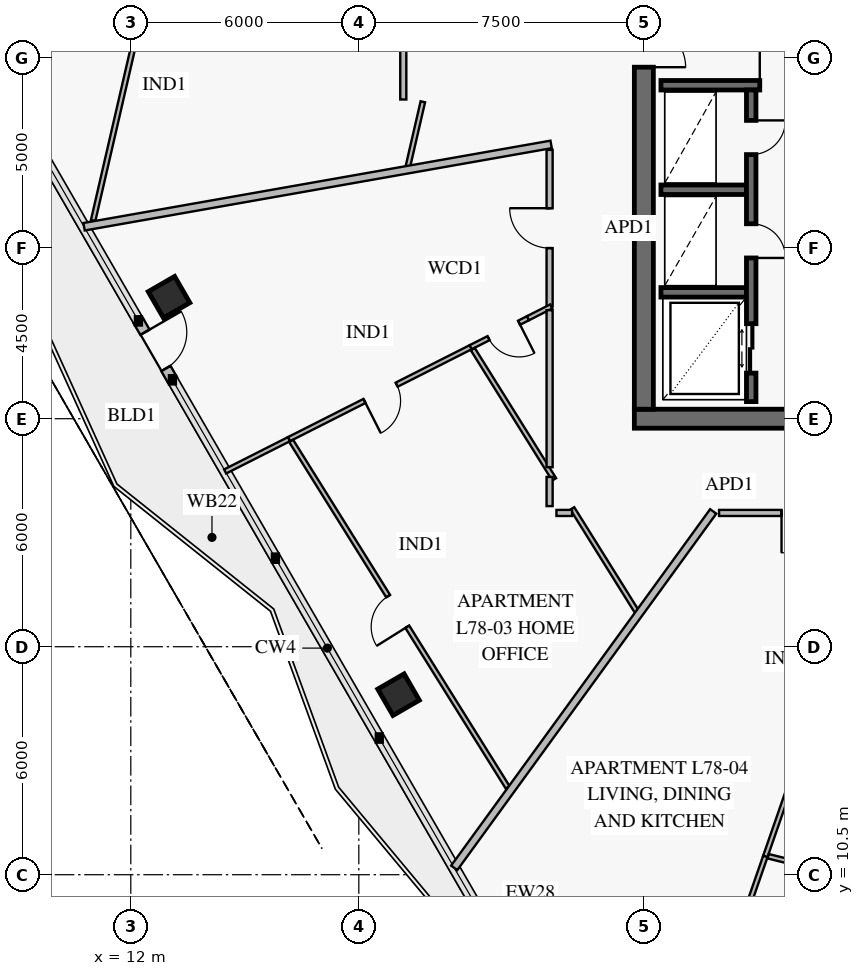
"""IFC4 building model, lengths in metres.
Left out: names, types, materials, properties, quantities, classifications, styles, units other than length and angle.
Written with IfcOpenShell. Run it as: python <this file> out.ifc"""

import sys

from ifc_helpers import new_model, si_unit, direction, frame, frame_2d, origin, origin_2d, place, context, subcontext, project, spatial, rectangle, extrude, element, fill, save


model = new_model("IFC4")
c1 = context("Model", 3, precision=1e-05, world=origin(), true_north=direction((0.0, 1.0)))
c2 = subcontext(c1, "Body", "Model", "MODEL_VIEW")
j1 = project(units=[si_unit("LENGTHUNIT", "METRE"), si_unit("PLANEANGLEUNIT", "RADIAN")], contexts=[c1])
p1 = place(None, origin())
s1 = spatial("IfcSite", under=j1, at=p1, CompositionType="ELEMENT")
p2 = place(p1, origin())
s2 = spatial("IfcBuilding", under=s1, at=p2, CompositionType="ELEMENT")
p3 = place(p2, frame((0.0, 0.0, 308.2)))
s3 = spatial("IfcBuildingStorey", under=s2, at=p3, CompositionType="ELEMENT", Elevation=308.2)
p4 = place(p3, frame((25.25, 22.5, 0.0), z_axis=(0.0, 0.0, 1.0), x_axis=(1.0, 0.0, 0.0)))
e1 = element("IfcWall", 1, at=p4, inside=s3, PredefinedType="SHEAR", context=c2, shape_type="SweptSolid", body=[
    extrude(rectangle(XDim=9.8, YDim=0.5, at=frame_2d((4.9, 0.0))), origin(), (0.0, 0.0, 1.0), 3.8),
])
p5 = place(p4, frame((4.15, 0.0, 0.0)))
e2 = element("IfcOpeningElement", 2, at=p5, cuts=e1, PredefinedType="OPENING", context=c2, shape_type="SweptSolid", body=[
    extrude(rectangle(XDim=1.5, YDim=2.15, at=frame_2d((0.75, 1.075))), frame((0.0, 0.262, 0.0), z_axis=(0.0, -1.0, 0.0), x_axis=(1.0, 0.0, 0.0)), (0.0, 0.0, 1.0), 0.524),
])
p6 = place(p3, frame((25.5, 22.75, 0.0), z_axis=(0.0, 0.0, 1.0), x_axis=(0.0, 1.0, 0.0)))
e3 = element("IfcWall", 3, at=p6, inside=s3, PredefinedType="SHEAR", context=c2, shape_type="SweptSolid", body=[
    extrude(rectangle(XDim=18.5, YDim=0.5, at=frame_2d((9.25, 0.0))), origin(), (0.0, 0.0, 1.0), 3.8),
])
p7 = place(p6, frame((9.0, 0.0, 0.0)))
e4 = element("IfcOpeningElement", 4, at=p7, cuts=e3, PredefinedType="OPENING", context=c2, shape_type="SweptSolid", body=[
    extrude(rectangle(XDim=1.1, YDim=2.15, at=frame_2d((0.55, 1.075))), frame((0.0, 0.262, 0.0), z_axis=(0.0, -1.0, 0.0), x_axis=(1.0, 0.0, 0.0)), (0.0, 0.0, 1.0), 0.524),
])
for number, where, z_axis, x_axis in (
    (5, (13.007, 25.698, 0.0), (0.0, 0.0, 1.0), (0.5, -0.866, 0.0)),
    (6, (19.045, 15.238, 0.0), (0.0, 0.0, 1.0), (0.5, -0.866, 0.0)),
):
    element("IfcColumn", number, at=place(p3, frame(where, z_axis=z_axis, x_axis=x_axis)), inside=s3, PredefinedType="COLUMN", context=c2, shape_type="SweptSolid", body=[
        extrude(rectangle(XDim=0.8, YDim=0.8, at=origin_2d()), origin(), (0.0, 0.0, 1.0), 3.55),
    ])
p8 = place(p3, frame((13.095, 23.524, 0.0), z_axis=(0.0, 0.0, 1.0), x_axis=(-0.499923131819, 0.866069779101, 0.0)))
e7 = element("IfcWall", 7, at=p8, inside=s3, PredefinedType="SOLIDWALL", context=c2, shape_type="SweptSolid", body=[
    extrude(rectangle(XDim=1.79, YDim=0.28, at=frame_2d((0.895, 0.0))), origin(), (0.0, 0.0, 1.0), 3.55),
])
p9 = place(p8, frame((0.345, 0.0, 0.0)))
e8 = element("IfcOpeningElement", 8, at=p9, cuts=e7, PredefinedType="OPENING", context=c2, shape_type="SweptSolid", body=[
    extrude(rectangle(XDim=1.1, YDim=2.2, at=frame_2d((0.55, 1.1))), frame((0.0, 0.152, 0.0), z_axis=(0.0, -1.0, 0.0), x_axis=(1.0, 0.0, 0.0)), (0.0, 0.0, 1.0), 0.304),
])
p10 = place(p3, frame((25.95, 31.275, 0.0), z_axis=(0.0, 0.0, 1.0), x_axis=(1.0, 0.0, 0.0)))
e9 = element("IfcWall", 9, at=p10, inside=s3, PredefinedType="SOLIDWALL", context=c2, shape_type="SweptSolid", body=[
    extrude(rectangle(XDim=20.1, YDim=0.25, at=frame_2d((10.05, 0.0))), origin(), (0.0, 0.0, 1.0), 3.8),
])
p11 = place(p10, frame((2.6, 0.0, 0.0)))
e10 = element("IfcOpeningElement", 10, at=p11, cuts=e9, PredefinedType="OPENING", context=c2, shape_type="SweptSolid", body=[
    extrude(rectangle(XDim=1.1, YDim=2.15, at=frame_2d((0.55, 1.075))), frame((0.0, 0.137, 0.0), z_axis=(0.0, -1.0, 0.0), x_axis=(1.0, 0.0, 0.0)), (0.0, 0.0, 1.0), 0.274),
])
p12 = place(p10, frame((10.6, 0.0, 0.0)))
e11 = element("IfcOpeningElement", 11, at=p12, cuts=e9, PredefinedType="OPENING", context=c2, shape_type="SweptSolid", body=[
    extrude(rectangle(XDim=1.1, YDim=2.15, at=frame_2d((0.55, 1.075))), frame((0.0, 0.137, 0.0), z_axis=(0.0, -1.0, 0.0), x_axis=(1.0, 0.0, 0.0)), (0.0, 0.0, 1.0), 0.274),
])
p13 = place(p10, frame((16.35, 0.0, 0.0)))
e12 = element("IfcOpeningElement", 12, at=p13, cuts=e9, PredefinedType="OPENING", context=c2, shape_type="SweptSolid", body=[
    extrude(rectangle(XDim=1.1, YDim=2.15, at=frame_2d((0.55, 1.075))), frame((0.0, 0.137, 0.0), z_axis=(0.0, -1.0, 0.0), x_axis=(1.0, 0.0, 0.0)), (0.0, 0.0, 1.0), 0.274),
])
for number, where, z_axis, x_axis in (
    (13, (25.95, 25.825, 0.0), (0.0, 0.0, 1.0), (1.0, 0.0, 0.0)),
    (14, (25.95, 28.525, 0.0), (0.0, 0.0, 1.0), (1.0, 0.0, 0.0)),
):
    element("IfcWall", number, at=place(p3, frame(where, z_axis=z_axis, x_axis=x_axis)), inside=s3, PredefinedType="SOLIDWALL", context=c2, shape_type="SweptSolid", body=[
        extrude(rectangle(XDim=2.25, YDim=0.25, at=frame_2d((1.125, 0.0))), origin(), (0.0, 0.0, 1.0), 3.8),
    ])
p14 = place(p3, frame((28.325, 22.95, 0.0), z_axis=(0.0, 0.0, 1.0), x_axis=(0.0, 1.0, 0.0)))
e15 = element("IfcWall", 15, at=p14, inside=s3, PredefinedType="SOLIDWALL", context=c2, shape_type="SweptSolid", body=[
    extrude(rectangle(XDim=8.2, YDim=0.25, at=frame_2d((4.1, 0.0))), origin(), (0.0, 0.0, 1.0), 3.8),
])
p15 = place(p14, frame((0.75, 0.0, 0.0)))
e16 = element("IfcOpeningElement", 16, at=p15, cuts=e15, PredefinedType="OPENING", context=c2, shape_type="SweptSolid", body=[
    extrude(rectangle(XDim=1.3, YDim=2.3, at=frame_2d((0.65, 1.15))), frame((0.0, 0.137, 0.0), z_axis=(0.0, -1.0, 0.0), x_axis=(1.0, 0.0, 0.0)), (0.0, 0.0, 1.0), 0.274),
])
p16 = place(p14, frame((3.78, 0.0, 0.0)))
e17 = element("IfcOpeningElement", 17, at=p16, cuts=e15, PredefinedType="OPENING", context=c2, shape_type="SweptSolid", body=[
    extrude(rectangle(XDim=0.9, YDim=2.1, at=frame_2d((0.45, 1.05))), frame((0.0, 0.137, 0.0), z_axis=(0.0, -1.0, 0.0), x_axis=(1.0, 0.0, 0.0)), (0.0, 0.0, 1.0), 0.274),
])
p17 = place(p14, frame((6.5, 0.0, 0.0)))
e18 = element("IfcOpeningElement", 18, at=p17, cuts=e15, PredefinedType="OPENING", context=c2, shape_type="SweptSolid", body=[
    extrude(rectangle(XDim=0.9, YDim=2.1, at=frame_2d((0.45, 1.05))), frame((0.0, 0.137, 0.0), z_axis=(0.0, -1.0, 0.0), x_axis=(1.0, 0.0, 0.0)), (0.0, 0.0, 1.0), 0.274),
])
p18 = place(p3, frame((13.356, 37.882, 0.0), z_axis=(0.0, 0.0, 1.0), x_axis=(-0.224948374829, -0.974370683396, 0.0)))
e19 = element("IfcWall", 19, at=p18, inside=s3, PredefinedType="PARTITIONING", context=c2, shape_type="SweptSolid", body=[
    extrude(rectangle(XDim=10.433, YDim=0.12, at=frame_2d((5.217, 0.0))), origin(), (0.0, 0.0, 1.0), 2.97),
])
p19 = place(p18, frame((4.742, 0.0, 0.0)))
e20 = element("IfcOpeningElement", 20, at=p19, cuts=e19, PredefinedType="OPENING", context=c2, shape_type="SweptSolid", body=[
    extrude(rectangle(XDim=0.95, YDim=2.1, at=frame_2d((0.475, 1.05))), frame((0.0, 0.072, 0.0), z_axis=(0.0, -1.0, 0.0), x_axis=(1.0, 0.0, 0.0)), (0.0, 0.0, 1.0), 0.144),
])
p20 = place(p3, frame((22.45, 25.144, 0.0), z_axis=(0.0, 0.0, 1.0), x_axis=(-0.892282910902, -0.451476695868, 0.0)))
e21 = element("IfcWall", 21, at=p20, inside=s3, PredefinedType="PARTITIONING", context=c2, shape_type="SweptSolid", body=[
    extrude(rectangle(XDim=1.693, YDim=0.12, at=frame_2d((0.847, 0.0))), origin(), (0.0, 0.0, 1.0), 3.55),
])
p21 = place(p20, frame((0.261, 0.0, 0.0)))
e22 = element("IfcOpeningElement", 22, at=p21, cuts=e21, PredefinedType="OPENING", context=c2, shape_type="SweptSolid", body=[
    extrude(rectangle(XDim=0.9, YDim=2.1, at=frame_2d((0.45, 1.05))), frame((0.0, 0.072, 0.0), z_axis=(0.0, -1.0, 0.0), x_axis=(1.0, 0.0, 0.0)), (0.0, 0.0, 1.0), 0.144),
])
p22 = place(p3, frame((20.939, 24.379, 0.0), z_axis=(0.0, 0.0, 1.0), x_axis=(-0.892264822084, -0.451512444205, 0.0)))
e23 = element("IfcWall", 23, at=p22, inside=s3, PredefinedType="PARTITIONING", context=c2, shape_type="SweptSolid", body=[
    extrude(rectangle(XDim=5.355, YDim=0.12, at=frame_2d((2.677, 0.0))), origin(), (0.0, 0.0, 1.0), 3.2),
])
p23 = place(p22, frame((2.177, 0.0, 0.0)))
e24 = element("IfcOpeningElement", 24, at=p23, cuts=e23, PredefinedType="OPENING", context=c2, shape_type="SweptSolid", body=[
    extrude(rectangle(XDim=0.95, YDim=2.1, at=frame_2d((0.475, 1.05))), frame((0.0, 0.072, 0.0), z_axis=(0.0, -1.0, 0.0), x_axis=(1.0, 0.0, 0.0)), (0.0, 0.0, 1.0), 0.144),
])
p24 = place(p3, frame((16.22, 21.915, 0.0), z_axis=(0.0, 0.0, 1.0), x_axis=(0.529909111027, -0.8480544405, 0.0)))
e25 = element("IfcWall", 25, at=p24, inside=s3, PredefinedType="PARTITIONING", context=c2, shape_type="SweptSolid", body=[
    extrude(rectangle(XDim=10.75, YDim=0.12, at=frame_2d((5.375, 0.0))), origin(), (0.0, 0.0, 1.0), 2.97),
])
p25 = place(p24, frame((4.815, 0.0, 0.0)))
e26 = element("IfcOpeningElement", 26, at=p25, cuts=e25, PredefinedType="OPENING", context=c2, shape_type="SweptSolid", body=[
    extrude(rectangle(XDim=0.95, YDim=2.1, at=frame_2d((0.475, 1.05))), frame((0.0, 0.072, 0.0), z_axis=(0.0, -1.0, 0.0), x_axis=(1.0, 0.0, 0.0)), (0.0, 0.0, 1.0), 0.144),
])
p26 = place(p3, frame((23.02, 29.574, 0.0), z_axis=(0.0, 0.0, 1.0), x_axis=(0.0, -1.0, 0.0)))
e27 = element("IfcWall", 27, at=p26, inside=s3, PredefinedType="PARTITIONING", context=c2, shape_type="SweptSolid", body=[
    extrude(rectangle(XDim=4.12, YDim=0.16, at=frame_2d((2.06, 0.0))), origin(), (0.0, 0.0, 1.0), 3.0),
])
p27 = place(p26, frame((1.535, 0.0, 0.0)))
e28 = element("IfcOpeningElement", 28, at=p27, cuts=e27, PredefinedType="OPENING", context=c2, shape_type="SweptSolid", body=[
    extrude(rectangle(XDim=1.05, YDim=2.15, at=frame_2d((0.525, 1.075))), frame((0.0, 0.092, 0.0), z_axis=(0.0, -1.0, 0.0), x_axis=(1.0, 0.0, 0.0)), (0.0, 0.0, 1.0), 0.184),
])
p28 = place(p3, frame((31.175, 18.113, 0.0), z_axis=(0.0, 0.0, 1.0), x_axis=(-0.32822845585, -0.944598370087, 0.0)))
e29 = element("IfcWall", 29, at=p28, inside=s3, PredefinedType="PARTITIONING", context=c2, shape_type="SweptSolid", body=[
    extrude(rectangle(XDim=7.552, YDim=0.12, at=frame_2d((3.776, 0.0))), origin(), (0.0, 0.0, 1.0), 3.55),
])
p29 = place(p28, frame((3.276, 0.0, 0.0)))
e30 = element("IfcOpeningElement", 30, at=p29, cuts=e29, PredefinedType="OPENING", context=c2, shape_type="SweptSolid", body=[
    extrude(rectangle(XDim=0.95, YDim=2.1, at=frame_2d((0.475, 1.05))), frame((0.0, 0.072, 0.0), z_axis=(0.0, -1.0, 0.0), x_axis=(1.0, 0.0, 0.0)), (0.0, 0.0, 1.0), 0.144),
])
p30 = place(p3, frame((28.771, 10.987, 0.0), z_axis=(0.0, 0.0, 1.0), x_axis=(0.970295811895, -0.241921552202, 0.0)))
e31 = element("IfcWall", 31, at=p30, inside=s3, PredefinedType="PARTITIONING", context=c2, shape_type="SweptSolid", body=[
    extrude(rectangle(XDim=10.759, YDim=0.12, at=frame_2d((5.379, 0.0))), origin(), (0.0, 0.0, 1.0), 2.97),
])
p31 = place(p30, frame((2.4, 0.0, 0.0)))
e32 = element("IfcOpeningElement", 32, at=p31, cuts=e31, PredefinedType="OPENING", context=c2, shape_type="SweptSolid", body=[
    extrude(rectangle(XDim=0.95, YDim=2.1, at=frame_2d((0.475, 1.05))), frame((0.0, 0.072, 0.0), z_axis=(0.0, -1.0, 0.0), x_axis=(1.0, 0.0, 0.0)), (0.0, 0.0, 1.0), 0.144),
])
p32 = place(p3, frame((27.479, 20.02, 0.0), z_axis=(0.0, 0.0, 1.0), x_axis=(1.0, 0.0, 0.0)))
e33 = element("IfcWall", 33, at=p32, inside=s3, PredefinedType="PARTITIONING", context=c2, shape_type="SweptSolid", body=[
    extrude(rectangle(XDim=4.337, YDim=0.16, at=frame_2d((2.168, 0.0))), origin(), (0.0, 0.0, 1.0), 3.55),
])
p33 = place(p32, frame((1.644, 0.0, 0.0)))
e34 = element("IfcOpeningElement", 34, at=p33, cuts=e33, PredefinedType="OPENING", context=c2, shape_type="SweptSolid", body=[
    extrude(rectangle(XDim=1.05, YDim=2.15, at=frame_2d((0.525, 1.075))), frame((0.0, 0.092, 0.0), z_axis=(0.0, -1.0, 0.0), x_axis=(1.0, 0.0, 0.0)), (0.0, 0.0, 1.0), 0.184),
])
p34 = place(p3, frame((19.685, 30.84, 0.0), z_axis=(0.0, 0.0, 1.0), x_axis=(-0.22491945774, -0.974377358896, 0.0)))
e35 = element("IfcWall", 35, at=p34, inside=s3, PredefinedType="PARTITIONING", context=c2, shape_type="SweptSolid", body=[
    extrude(rectangle(XDim=1.784, YDim=0.12, at=frame_2d((0.892, 0.0))), origin(), (0.0, 0.0, 1.0), 3.55),
])
p35 = place(p3, frame((23.06, 29.718, 0.0), z_axis=(0.0, 0.0, 1.0), x_axis=(-0.984808757343, -0.173642481728, 0.0)))
e36 = element("IfcWall", 36, at=p35, inside=s3, PredefinedType="PARTITIONING", context=c2, shape_type="SweptSolid", body=[
    extrude(rectangle(XDim=12.48, YDim=0.2, at=frame_2d((6.24, 0.0))), origin(), (0.0, 0.0, 1.0), 2.97),
])
p36 = place(p3, frame((23.062, 25.453, 0.0), z_axis=(0.0, 0.0, 1.0), x_axis=(-0.892282355031, -0.451477794471, 0.0)))
e37 = element("IfcWall", 37, at=p36, inside=s3, PredefinedType="PARTITIONING", context=c2, shape_type="SweptSolid", body=[
    extrude(rectangle(XDim=0.686, YDim=0.12, at=frame_2d((0.343, 0.0))), origin(), (0.0, 0.0, 1.0), 3.55),
])
p37 = place(p3, frame((16.161, 21.961, 0.0), z_axis=(0.0, 0.0, 1.0), x_axis=(-0.892263035208, -0.451515975356, 0.0)))
e38 = element("IfcWall", 38, at=p37, inside=s3, PredefinedType="PARTITIONING", context=c2, shape_type="SweptSolid", body=[
    extrude(rectangle(XDim=1.882, YDim=0.12, at=frame_2d((0.941, 0.0))), origin(), (0.0, 0.0, 1.0), 2.97),
])
p38 = place(p3, frame((20.998, 24.333, 0.0), z_axis=(0.0, 0.0, 1.0), x_axis=(0.529874080143, -0.848076328636, 0.0)))
e39 = element("IfcWall", 39, at=p38, inside=s3, PredefinedType="PARTITIONING", context=c2, shape_type="SweptSolid", body=[
    extrude(rectangle(XDim=4.043, YDim=0.12, at=frame_2d((2.021, 0.0))), origin(), (0.0, 0.0, 1.0), 3.55),
])
p39 = place(p3, frame((23.617, 20.14, 0.0), z_axis=(0.0, 0.0, 1.0), x_axis=(0.529937667558, -0.848036596205, 0.0)))
e40 = element("IfcWall", 40, at=p39, inside=s3, PredefinedType="PARTITIONING", context=c2, shape_type="SweptSolid", body=[
    extrude(rectangle(XDim=3.223, YDim=0.12, at=frame_2d((1.612, 0.0))), origin(), (0.0, 0.0, 1.0), 3.0),
])
p40 = place(p3, frame((27.325, 20.06, 0.0), z_axis=(0.0, 0.0, 1.0), x_axis=(-0.587784737056, -0.809017368716, 0.0)))
e41 = element("IfcWall", 41, at=p40, inside=s3, PredefinedType="PARTITIONING", context=c2, shape_type="SweptSolid", body=[
    extrude(rectangle(XDim=11.594, YDim=0.2, at=frame_2d((5.797, 0.0))), origin(), (0.0, 0.0, 1.0), 2.97),
])
p41 = place(p3, frame((28.696, 10.979, 0.0), z_axis=(0.0, 0.0, 1.0), x_axis=(-0.328219248411, -0.944601569432, 0.0)))
e42 = element("IfcWall", 42, at=p41, inside=s3, PredefinedType="PARTITIONING", context=c2, shape_type="SweptSolid", body=[
    extrude(rectangle(XDim=3.236, YDim=0.12, at=frame_2d((1.618, 0.0))), origin(), (0.0, 0.0, 1.0), 2.97),
])
p42 = place(p3, frame((19.17, 33.1, 0.0), z_axis=(0.0, 0.0, 1.0), x_axis=(0.0, -1.0, 0.0)))
e43 = element("IfcWall", 43, at=p42, inside=s3, PredefinedType="PARTITIONING", context=c2, shape_type="SweptSolid", body=[
    extrude(rectangle(XDim=2.2, YDim=0.16, at=frame_2d((1.1, 0.0))), origin(), (0.0, 0.0, 1.0), 3.55),
])
p43 = place(p3, frame((23.02, 25.356, 0.0), z_axis=(0.0, 0.0, 1.0), x_axis=(0.0, -1.0, 0.0)))
e44 = element("IfcWall", 44, at=p43, inside=s3, PredefinedType="PARTITIONING", context=c2, shape_type="SweptSolid", body=[
    extrude(rectangle(XDim=4.131, YDim=0.16, at=frame_2d((2.065, 0.0))), origin(), (0.0, 0.0, 1.0), 3.55),
])
p44 = place(p3, frame((23.02, 20.968, 0.0), z_axis=(0.0, 0.0, 1.0), x_axis=(0.0, -1.0, 0.0)))
e45 = element("IfcWall", 45, at=p44, inside=s3, PredefinedType="PARTITIONING", context=c2, shape_type="SweptSolid", body=[
    extrude(rectangle(XDim=0.768, YDim=0.16, at=frame_2d((0.384, 0.0))), origin(), (0.0, 0.0, 1.0), 3.55),
])
p45 = place(p3, frame((23.2, 20.02, 0.0), z_axis=(0.0, 0.0, 1.0), x_axis=(1.0, 0.0, 0.0)))
e46 = element("IfcWall", 46, at=p45, inside=s3, PredefinedType="PARTITIONING", context=c2, shape_type="SweptSolid", body=[
    extrude(rectangle(XDim=0.412, YDim=0.16, at=frame_2d((0.206, 0.0))), origin(), (0.0, 0.0, 1.0), 3.55),
])
p46 = place(p9, frame((1.1, 0.0, 0.0), z_axis=(0.0, 0.0, 1.0), x_axis=(-1.0, 0.0, 0.0)))
e47 = element("IfcDoor", 47, at=p46, inside=s3, OperationType="SINGLE_SWING_LEFT", PredefinedType="DOOR", context=c2, shape_type="SweptSolid", body=[
    extrude(rectangle(XDim=1.1, YDim=2.2, at=frame_2d((0.55, 1.1))), frame((0.0, 0.025, 0.0), z_axis=(0.0, -1.0, 0.0), x_axis=(1.0, 0.0, 0.0)), (0.0, 0.0, 1.0), 0.05),
])
fill(e8, e47)
p47 = place(p7, frame((1.1, 0.0, 0.0), z_axis=(0.0, 0.0, 1.0), x_axis=(-1.0, 0.0, 0.0)))
e48 = element("IfcDoor", 48, at=p47, inside=s3, OperationType="SINGLE_SWING_RIGHT", PredefinedType="USERDEFINED", context=c2, shape_type="SweptSolid", body=[
    extrude(rectangle(XDim=1.1, YDim=2.15, at=frame_2d((0.55, 1.075))), frame((0.0, 0.025, 0.0), z_axis=(0.0, -1.0, 0.0), x_axis=(1.0, 0.0, 0.0)), (0.0, 0.0, 1.0), 0.05),
])
fill(e4, e48)
p48 = place(p11, origin())
e49 = element("IfcDoor", 49, at=p48, inside=s3, OperationType="SINGLE_SWING_LEFT", PredefinedType="USERDEFINED", context=c2, shape_type="SweptSolid", body=[
    extrude(rectangle(XDim=1.1, YDim=2.15, at=frame_2d((0.55, 1.075))), frame((0.0, 0.025, 0.0), z_axis=(0.0, -1.0, 0.0), x_axis=(1.0, 0.0, 0.0)), (0.0, 0.0, 1.0), 0.05),
])
fill(e10, e49)
p49 = place(p15, frame((1.3, 0.0, 0.0), z_axis=(0.0, 0.0, 1.0), x_axis=(-1.0, 0.0, 0.0)))
e50 = element("IfcDoor", 50, at=p49, inside=s3, OperationType="DOUBLE_DOOR_SLIDING", PredefinedType="DOOR", context=c2, shape_type="SweptSolid", body=[
    extrude(rectangle(XDim=1.3, YDim=2.3, at=frame_2d((0.65, 1.15))), frame((0.0, 0.025, 0.0), z_axis=(0.0, -1.0, 0.0), x_axis=(1.0, 0.0, 0.0)), (0.0, 0.0, 1.0), 0.05),
])
fill(e16, e50)
p50 = place(p16, frame((0.9, 0.0, 0.0), z_axis=(0.0, 0.0, 1.0), x_axis=(-1.0, 0.0, 0.0)))
e51 = element("IfcDoor", 51, at=p50, inside=s3, OperationType="SINGLE_SWING_RIGHT", PredefinedType="DOOR", context=c2, shape_type="SweptSolid", body=[
    extrude(rectangle(XDim=0.9, YDim=2.1, at=frame_2d((0.45, 1.05))), frame((0.0, 0.025, 0.0), z_axis=(0.0, -1.0, 0.0), x_axis=(1.0, 0.0, 0.0)), (0.0, 0.0, 1.0), 0.05),
])
fill(e17, e51)
p51 = place(p17, frame((0.9, 0.0, 0.0), z_axis=(0.0, 0.0, 1.0), x_axis=(-1.0, 0.0, 0.0)))
e52 = element("IfcDoor", 52, at=p51, inside=s3, OperationType="SINGLE_SWING_LEFT", PredefinedType="DOOR", context=c2, shape_type="SweptSolid", body=[
    extrude(rectangle(XDim=0.9, YDim=2.1, at=frame_2d((0.45, 1.05))), frame((0.0, 0.025, 0.0), z_axis=(0.0, -1.0, 0.0), x_axis=(1.0, 0.0, 0.0)), (0.0, 0.0, 1.0), 0.05),
])
fill(e18, e52)
p52 = place(p21, origin())
e53 = element("IfcDoor", 53, at=p52, inside=s3, OperationType="SINGLE_SWING_LEFT", PredefinedType="DOOR", context=c2, shape_type="SweptSolid", body=[
    extrude(rectangle(XDim=0.9, YDim=2.1, at=frame_2d((0.45, 1.05))), frame((0.0, 0.025, 0.0), z_axis=(0.0, -1.0, 0.0), x_axis=(1.0, 0.0, 0.0)), (0.0, 0.0, 1.0), 0.05),
])
fill(e22, e53)
p53 = place(p23, origin())
e54 = element("IfcDoor", 54, at=p53, inside=s3, OperationType="SINGLE_SWING_RIGHT", PredefinedType="DOOR", context=c2, shape_type="SweptSolid", body=[
    extrude(rectangle(XDim=0.95, YDim=2.1, at=frame_2d((0.475, 1.05))), frame((0.0, 0.025, 0.0), z_axis=(0.0, -1.0, 0.0), x_axis=(1.0, 0.0, 0.0)), (0.0, 0.0, 1.0), 0.05),
])
fill(e24, e54)
p54 = place(p25, frame((0.95, 0.0, 0.0), z_axis=(0.0, 0.0, 1.0), x_axis=(-1.0, 0.0, 0.0)))
e55 = element("IfcDoor", 55, at=p54, inside=s3, OperationType="SINGLE_SWING_LEFT", PredefinedType="DOOR", context=c2, shape_type="SweptSolid", body=[
    extrude(rectangle(XDim=0.95, YDim=2.1, at=frame_2d((0.475, 1.05))), frame((0.0, 0.025, 0.0), z_axis=(0.0, -1.0, 0.0), x_axis=(1.0, 0.0, 0.0)), (0.0, 0.0, 1.0), 0.05),
])
fill(e26, e55)
p55 = place(p27, frame((1.05, 0.0, 0.0), z_axis=(0.0, 0.0, 1.0), x_axis=(-1.0, 0.0, 0.0)))
e56 = element("IfcDoor", 56, at=p55, inside=s3, OperationType="SINGLE_SWING_RIGHT", PredefinedType="DOOR", context=c2, shape_type="SweptSolid", body=[
    extrude(rectangle(XDim=1.05, YDim=2.15, at=frame_2d((0.525, 1.075))), frame((0.0, 0.025, 0.0), z_axis=(0.0, -1.0, 0.0), x_axis=(1.0, 0.0, 0.0)), (0.0, 0.0, 1.0), 0.05),
])
fill(e28, e56)
p56 = place(p33, frame((1.05, 0.0, 0.0), z_axis=(0.0, 0.0, 1.0), x_axis=(-1.0, 0.0, 0.0)))
e57 = element("IfcDoor", 57, at=p56, inside=s3, OperationType="SINGLE_SWING_RIGHT", PredefinedType="DOOR", context=c2, shape_type="SweptSolid", body=[
    extrude(rectangle(XDim=1.05, YDim=2.15, at=frame_2d((0.525, 1.075))), frame((0.0, 0.025, 0.0), z_axis=(0.0, -1.0, 0.0), x_axis=(1.0, 0.0, 0.0)), (0.0, 0.0, 1.0), 0.05),
])
fill(e34, e57)
save(model, sys.argv[1])
